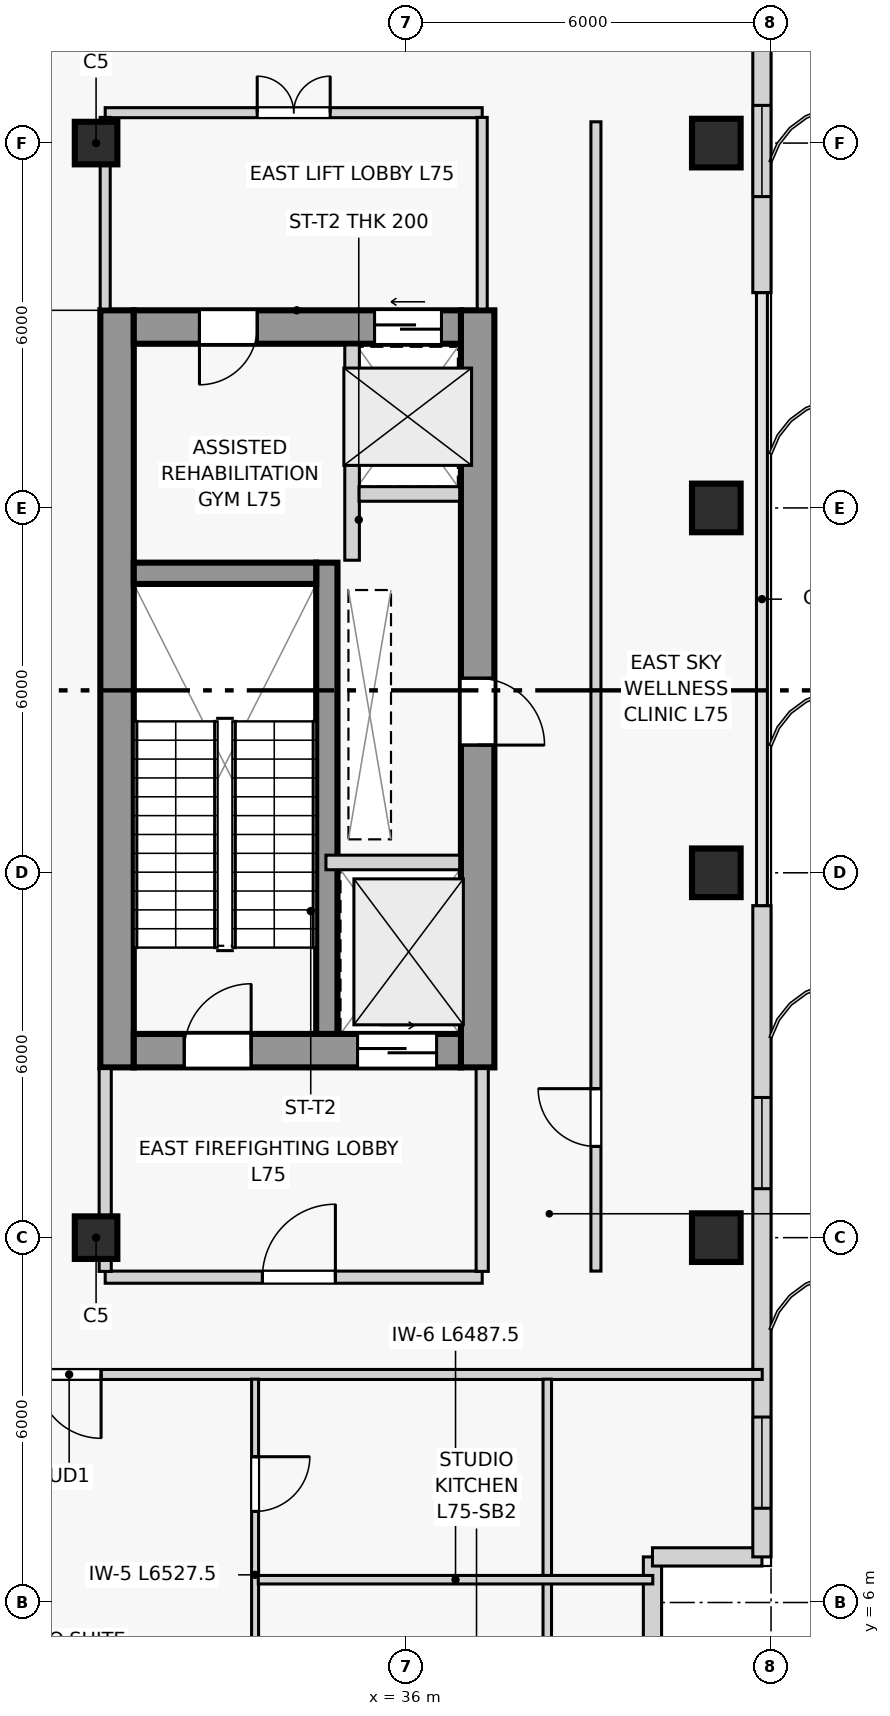
"""IFC4 building model, lengths in metres.
Left out: names, types, materials, properties, quantities, classifications, styles, units other than length and angle.
Written with IfcOpenShell. Run it as: python <this file> out.ifc"""

import sys

from ifc_helpers import new_model, si_unit, direction, frame, frame_2d, origin, origin_2d, place, context, subcontext, project, spatial, rectangle, extrude, source, transform, mapped, element, fill, save


model = new_model("IFC4")
c1 = context("Model", 3, precision=1e-05, world=origin(), true_north=direction((0.0, 1.0)))
c2 = subcontext(c1, "Body", "Model", "MODEL_VIEW")
j1 = project(units=[si_unit("LENGTHUNIT", "METRE"), si_unit("PLANEANGLEUNIT", "RADIAN")], contexts=[c1])
p1 = place(None, origin())
s1 = spatial("IfcSite", under=j1, at=p1, CompositionType="ELEMENT")
p2 = place(p1, origin())
s2 = spatial("IfcBuilding", under=s1, at=p2, CompositionType="ELEMENT")
p3 = place(p2, frame((0.0, 0.0, 285.3)))
s3 = spatial("IfcBuildingStorey", under=s2, at=p3, CompositionType="ELEMENT", Elevation=285.3)
p4 = place(p3, frame((31.245, 14.8, 0.0), z_axis=(0.0, 0.0, 1.0), x_axis=(0.0, 1.0, 0.0)))
e1 = element("IfcWall", 1, at=p4, inside=s3, PredefinedType="SHEAR", context=c2, shape_type="SweptSolid", body=[
    extrude(rectangle(XDim=12.45, YDim=0.55, at=frame_2d((6.225, 0.0))), origin(), (0.0, 0.0, 1.0), 4.2),
])
p5 = place(p3, frame((37.175, 14.8, 0.0), z_axis=(0.0, 0.0, 1.0), x_axis=(0.0, 1.0, 0.0)))
e2 = element("IfcWall", 2, at=p5, inside=s3, PredefinedType="SHEAR", context=c2, shape_type="SweptSolid", body=[
    extrude(rectangle(XDim=12.45, YDim=0.55, at=frame_2d((6.225, 0.0))), origin(), (0.0, 0.0, 1.0), 4.2),
])
p6 = place(p5, frame((5.3, 0.0, 0.0)))
e3 = element("IfcOpeningElement", 3, at=p6, cuts=e2, PredefinedType="OPENING", context=c2, shape_type="SweptSolid", body=[
    extrude(rectangle(XDim=1.1, YDim=2.2, at=frame_2d((0.55, 1.1))), frame((0.0, 0.285, 0.0), z_axis=(0.0, -1.0, 0.0), x_axis=(1.0, 0.0, 0.0)), (0.0, 0.0, 1.0), 0.57),
])
p7 = place(p3, frame((31.52, 15.075, 0.0), z_axis=(0.0, 0.0, 1.0), x_axis=(1.0, 0.0, 0.0)))
e4 = element("IfcWall", 4, at=p7, inside=s3, PredefinedType="SHEAR", context=c2, shape_type="SweptSolid", body=[
    extrude(rectangle(XDim=5.38, YDim=0.55, at=frame_2d((2.69, 0.0))), origin(), (0.0, 0.0, 1.0), 4.2),
])
p8 = place(p7, frame((0.83, 0.0, 0.0)))
e5 = element("IfcOpeningElement", 5, at=p8, cuts=e4, PredefinedType="OPENING", context=c2, shape_type="SweptSolid", body=[
    extrude(rectangle(XDim=1.1, YDim=2.2, at=frame_2d((0.55, 1.1))), frame((0.0, 0.285, 0.0), z_axis=(0.0, -1.0, 0.0), x_axis=(1.0, 0.0, 0.0)), (0.0, 0.0, 1.0), 0.57),
])
p9 = place(p7, frame((3.68, 0.0, 0.0)))
e6 = element("IfcOpeningElement", 6, at=p9, cuts=e4, PredefinedType="OPENING", context=c2, shape_type="SweptSolid", body=[
    extrude(rectangle(XDim=1.3, YDim=2.2, at=frame_2d((0.65, 1.1))), frame((0.0, 0.285, 0.0), z_axis=(0.0, -1.0, 0.0), x_axis=(1.0, 0.0, 0.0)), (0.0, 0.0, 1.0), 0.57),
])
p10 = place(p3, frame((31.52, 26.975, 0.0), z_axis=(0.0, 0.0, 1.0), x_axis=(1.0, 0.0, 0.0)))
e7 = element("IfcWall", 7, at=p10, inside=s3, PredefinedType="SHEAR", context=c2, shape_type="SweptSolid", body=[
    extrude(rectangle(XDim=5.38, YDim=0.55, at=frame_2d((2.69, 0.0))), origin(), (0.0, 0.0, 1.0), 4.2),
])
p11 = place(p10, frame((1.08, 0.0, 0.0)))
e8 = element("IfcOpeningElement", 8, at=p11, cuts=e7, PredefinedType="OPENING", context=c2, shape_type="SweptSolid", body=[
    extrude(rectangle(XDim=0.95, YDim=2.1, at=frame_2d((0.475, 1.05))), frame((0.0, 0.285, 0.0), z_axis=(0.0, -1.0, 0.0), x_axis=(1.0, 0.0, 0.0)), (0.0, 0.0, 1.0), 0.57),
])
p12 = place(p10, frame((3.96, 0.0, 0.0)))
e9 = element("IfcOpeningElement", 9, at=p12, cuts=e7, PredefinedType="OPENING", context=c2, shape_type="SweptSolid", body=[
    extrude(rectangle(XDim=1.1, YDim=2.2, at=frame_2d((0.55, 1.1))), frame((0.0, 0.285, 0.0), z_axis=(0.0, -1.0, 0.0), x_axis=(1.0, 0.0, 0.0)), (0.0, 0.0, 1.0), 0.57),
])
p13 = place(p3, frame((34.695, 15.35, 0.0), z_axis=(0.0, 0.0, 1.0), x_axis=(0.0, 1.0, 0.0)))
e10 = element("IfcWall", 10, at=p13, inside=s3, PredefinedType="SHEAR", context=c2, shape_type="SweptSolid", body=[
    extrude(rectangle(XDim=7.75, YDim=0.35, at=frame_2d((3.875, 0.0))), origin(), (0.0, 0.0, 1.0), 4.2),
])
p14 = place(p3, frame((31.52, 22.925, 0.0), z_axis=(0.0, 0.0, 1.0), x_axis=(1.0, 0.0, 0.0)))
e11 = element("IfcWall", 11, at=p14, inside=s3, PredefinedType="SHEAR", context=c2, shape_type="SweptSolid", body=[
    extrude(rectangle(XDim=3.0, YDim=0.35, at=frame_2d((1.5, 0.0))), origin(), (0.0, 0.0, 1.0), 4.2),
])
m1 = source(origin(), c2, "Body", "SweptSolid", [
    extrude(rectangle(XDim=0.8, YDim=0.8, at=origin_2d()), origin(), (0.0, 0.0, 1.0), 4.2),
])
for number, where, z_axis, x_axis in (
    (12, (41.1, 12.0, 0.0), (0.0, 0.0, 1.0), (1.0, 0.0, 0.0)),
    (13, (41.1, 18.0, 0.0), (0.0, 0.0, 1.0), (1.0, 0.0, 0.0)),
    (14, (41.1, 24.0, 0.0), (0.0, 0.0, 1.0), (1.0, 0.0, 0.0)),
    (15, (41.1, 30.0, 0.0), (0.0, 0.0, 1.0), (1.0, 0.0, 0.0)),
):
    element("IfcColumn", number, at=place(p3, frame(where, z_axis=z_axis, x_axis=x_axis)), inside=s3, PredefinedType="COLUMN", context=c2, shape_type="MappedRepresentation", body=[
        mapped(m1, transform((0.0, 0.0, 0.0), scale=1.0)),
    ])
m2 = source(origin(), c2, "Body", "SweptSolid", [
    extrude(rectangle(XDim=0.7, YDim=0.7, at=origin_2d()), origin(), (0.0, 0.0, 1.0), 4.2),
])
for number, where, z_axis, x_axis in (
    (16, (30.9, 12.0, 0.0), (0.0, 0.0, 1.0), (1.0, 0.0, 0.0)),
    (17, (30.9, 30.0, 0.0), (0.0, 0.0, 1.0), (1.0, 0.0, 0.0)),
):
    element("IfcColumn", number, at=place(p3, frame(where, z_axis=z_axis, x_axis=x_axis)), inside=s3, PredefinedType="COLUMN", context=c2, shape_type="MappedRepresentation", body=[
        mapped(m2, transform((0.0, 0.0, 0.0), scale=1.0)),
    ])
for number, where, z_axis, x_axis in (
    (18, (40.05, 4.95, 0.0), (0.0, 0.0, 1.0), (0.0, 1.0, 0.0)),
    (19, (40.05, 6.75, 0.0), (0.0, 0.0, 1.0), (1.0, 0.0, 0.0)),
):
    element("IfcWall", number, at=place(p3, frame(where, z_axis=z_axis, x_axis=x_axis)), inside=s3, PredefinedType="SOLIDWALL", context=c2, shape_type="SweptSolid", body=[
        extrude(rectangle(XDim=1.8, YDim=0.3, at=frame_2d((0.9, 0.0))), origin(), (0.0, 0.0, 1.0), 3.92),
    ])
p15 = place(p3, frame((41.85, 6.75, 0.0), z_axis=(0.0, 0.0, 1.0), x_axis=(0.0, 1.0, 0.0)))
e20 = element("IfcWall", 20, at=p15, inside=s3, PredefinedType="SOLIDWALL", context=c2, shape_type="SweptSolid", body=[
    extrude(rectangle(XDim=10.71, YDim=0.3, at=frame_2d((5.355, 0.0))), origin(), (0.0, 0.0, 1.0), 3.92),
])
p16 = place(p15, frame((0.8, 0.0, 0.85)))
e21 = element("IfcOpeningElement", 21, at=p16, cuts=e20, PredefinedType="OPENING", context=c2, shape_type="SweptSolid", body=[
    extrude(rectangle(XDim=1.5, YDim=1.8, at=frame_2d((0.75, 0.9))), frame((0.0, 0.16, 0.0), z_axis=(0.0, -1.0, 0.0), x_axis=(1.0, 0.0, 0.0)), (0.0, 0.0, 1.0), 0.32),
])
p17 = place(p15, frame((6.055, 0.0, 0.85)))
e22 = element("IfcOpeningElement", 22, at=p17, cuts=e20, PredefinedType="OPENING", context=c2, shape_type="SweptSolid", body=[
    extrude(rectangle(XDim=1.5, YDim=1.8, at=frame_2d((0.75, 0.9))), frame((0.0, 0.16, 0.0), z_axis=(0.0, -1.0, 0.0), x_axis=(1.0, 0.0, 0.0)), (0.0, 0.0, 1.0), 0.32),
])
p18 = place(p3, frame((41.85, 27.54, 0.0), z_axis=(0.0, 0.0, 1.0), x_axis=(0.0, 1.0, 0.0)))
e23 = element("IfcWall", 23, at=p18, inside=s3, PredefinedType="SOLIDWALL", context=c2, shape_type="SweptSolid", body=[
    extrude(rectangle(XDim=10.71, YDim=0.3, at=frame_2d((5.355, 0.0))), origin(), (0.0, 0.0, 1.0), 3.92),
])
p19 = place(p18, frame((1.58, 0.0, 0.85)))
e24 = element("IfcOpeningElement", 24, at=p19, cuts=e23, PredefinedType="OPENING", context=c2, shape_type="SweptSolid", body=[
    extrude(rectangle(XDim=1.5, YDim=1.8, at=frame_2d((0.75, 0.9))), frame((0.0, 0.16, 0.0), z_axis=(0.0, -1.0, 0.0), x_axis=(1.0, 0.0, 0.0)), (0.0, 0.0, 1.0), 0.32),
])
p20 = place(p18, frame((6.835, 0.0, 0.85)))
e25 = element("IfcOpeningElement", 25, at=p20, cuts=e23, PredefinedType="OPENING", context=c2, shape_type="SweptSolid", body=[
    extrude(rectangle(XDim=1.5, YDim=1.8, at=frame_2d((0.75, 0.9))), frame((0.0, 0.16, 0.0), z_axis=(0.0, -1.0, 0.0), x_axis=(1.0, 0.0, 0.0)), (0.0, 0.0, 1.0), 0.32),
])
p21 = place(p3, frame((34.68, 18.17, 0.0), z_axis=(0.0, 0.0, 1.0), x_axis=(1.0, 0.0, 0.0)))
e26 = element("IfcWall", 26, at=p21, inside=s3, PredefinedType="PARTITIONING", context=c2, shape_type="SweptSolid", body=[
    extrude(rectangle(XDim=2.2, YDim=0.24, at=frame_2d((1.1, 0.0))), origin(), (0.0, 0.0, 1.0), 3.92),
])
p22 = place(p3, frame((31.05, 11.35, 0.0), z_axis=(0.0, 0.0, 1.0), x_axis=(1.0, 0.0, 0.0)))
e27 = element("IfcWall", 27, at=p22, inside=s3, PredefinedType="PARTITIONING", context=c2, shape_type="SweptSolid", body=[
    extrude(rectangle(XDim=6.2, YDim=0.2, at=frame_2d((3.1, 0.0))), origin(), (0.0, 0.0, 1.0), 3.92),
])
p23 = place(p22, frame((2.586, 0.0, 0.0)))
e28 = element("IfcOpeningElement", 28, at=p23, cuts=e27, PredefinedType="OPENING", context=c2, shape_type="SweptSolid", body=[
    extrude(rectangle(XDim=1.2, YDim=2.2, at=frame_2d((0.6, 1.1))), frame((0.0, 0.11, 0.0), z_axis=(0.0, -1.0, 0.0), x_axis=(1.0, 0.0, 0.0)), (0.0, 0.0, 1.0), 0.22),
])
p24 = place(p3, frame((31.05, 11.445, 0.0), z_axis=(0.0, 0.0, 1.0), x_axis=(0.0, 1.0, 0.0)))
e29 = element("IfcWall", 29, at=p24, inside=s3, PredefinedType="PARTITIONING", context=c2, shape_type="SweptSolid", body=[
    extrude(rectangle(XDim=3.335, YDim=0.2, at=frame_2d((1.667, 0.0))), origin(), (0.0, 0.0, 1.0), 3.07),
])
p25 = place(p3, frame((37.25, 11.445, 0.0), z_axis=(0.0, 0.0, 1.0), x_axis=(0.0, 1.0, 0.0)))
e30 = element("IfcWall", 30, at=p25, inside=s3, PredefinedType="PARTITIONING", context=c2, shape_type="SweptSolid", body=[
    extrude(rectangle(XDim=3.335, YDim=0.2, at=frame_2d((1.667, 0.0))), origin(), (0.0, 0.0, 1.0), 3.92),
])
p26 = place(p3, frame((35.11, 23.14, 0.0), z_axis=(0.0, 0.0, 1.0), x_axis=(0.0, 1.0, 0.0)))
e31 = element("IfcWall", 31, at=p26, inside=s3, PredefinedType="PARTITIONING", context=c2, shape_type="SweptSolid", body=[
    extrude(rectangle(XDim=3.54, YDim=0.24, at=frame_2d((1.77, 0.0))), origin(), (0.0, 0.0, 1.0), 3.92),
])
p27 = place(p3, frame((35.225, 24.23, 0.0), z_axis=(0.0, 0.0, 1.0), x_axis=(1.0, 0.0, 0.0)))
e32 = element("IfcWall", 32, at=p27, inside=s3, PredefinedType="PARTITIONING", context=c2, shape_type="SweptSolid", body=[
    extrude(rectangle(XDim=1.655, YDim=0.24, at=frame_2d((0.827, 0.0))), origin(), (0.0, 0.0, 1.0), 3.92),
])
p28 = place(p3, frame((31.05, 30.5, 0.0), z_axis=(0.0, 0.0, 1.0), x_axis=(1.0, 0.0, 0.0)))
e33 = element("IfcWall", 33, at=p28, inside=s3, PredefinedType="PARTITIONING", context=c2, shape_type="SweptSolid", body=[
    extrude(rectangle(XDim=6.2, YDim=0.165, at=frame_2d((3.1, 0.0))), origin(), (0.0, 0.0, 1.0), 3.92),
])
p29 = place(p28, frame((2.5, 0.0, 0.0)))
e34 = element("IfcOpeningElement", 34, at=p29, cuts=e33, PredefinedType="OPENING", context=c2, shape_type="SweptSolid", body=[
    extrude(rectangle(XDim=1.2, YDim=2.2, at=frame_2d((0.6, 1.1))), frame((0.0, 0.093, 0.0), z_axis=(0.0, -1.0, 0.0), x_axis=(1.0, 0.0, 0.0)), (0.0, 0.0, 1.0), 0.185),
])
for number, where, z_axis, x_axis in (
    (35, (31.05, 27.27, 0.0), (0.0, 0.0, 1.0), (0.0, 1.0, 0.0)),
    (36, (37.25, 27.27, 0.0), (0.0, 0.0, 1.0), (0.0, 1.0, 0.0)),
):
    element("IfcWall", number, at=place(p3, frame(where, z_axis=z_axis, x_axis=x_axis)), inside=s3, PredefinedType="PARTITIONING", context=c2, shape_type="SweptSolid", body=[
        extrude(rectangle(XDim=3.153, YDim=0.165, at=frame_2d((1.576, 0.0))), origin(), (0.0, 0.0, 1.0), 3.92),
    ])
p30 = place(p3, frame((3.145, 9.75, 0.0), z_axis=(0.0, 0.0, 1.0), x_axis=(1.0, 0.0, 0.0)))
e37 = element("IfcWall", 37, at=p30, inside=s3, PredefinedType="PARTITIONING", context=c2, shape_type="SweptSolid", body=[
    extrude(rectangle(XDim=38.71, YDim=0.165, at=frame_2d((19.355, 0.0))), origin(), (0.0, 0.0, 1.0), 3.92),
])
p31 = place(p30, frame((7.395, 0.0, 0.0)))
e38 = element("IfcOpeningElement", 38, at=p31, cuts=e37, PredefinedType="OPENING", context=c2, shape_type="SweptSolid", body=[
    extrude(rectangle(XDim=1.2, YDim=2.2, at=frame_2d((0.6, 1.1))), frame((0.0, 0.093, 0.0), z_axis=(0.0, -1.0, 0.0), x_axis=(1.0, 0.0, 0.0)), (0.0, 0.0, 1.0), 0.185),
])
p32 = place(p30, frame((17.755, 0.0, 0.0)))
e39 = element("IfcOpeningElement", 39, at=p32, cuts=e37, PredefinedType="OPENING", context=c2, shape_type="SweptSolid", body=[
    extrude(rectangle(XDim=1.2, YDim=2.2, at=frame_2d((0.6, 1.1))), frame((0.0, 0.093, 0.0), z_axis=(0.0, -1.0, 0.0), x_axis=(1.0, 0.0, 0.0)), (0.0, 0.0, 1.0), 0.185),
])
p33 = place(p30, frame((26.788, 0.0, 0.0)))
e40 = element("IfcOpeningElement", 40, at=p33, cuts=e37, PredefinedType="OPENING", context=c2, shape_type="SweptSolid", body=[
    extrude(rectangle(XDim=1.05, YDim=2.15, at=frame_2d((0.525, 1.075))), frame((0.0, 0.093, 0.0), z_axis=(0.0, -1.0, 0.0), x_axis=(1.0, 0.0, 0.0)), (0.0, 0.0, 1.0), 0.185),
])
p34 = place(p3, frame((39.12, 11.45, 0.0), z_axis=(0.0, 0.0, 1.0), x_axis=(0.0, 1.0, 0.0)))
e41 = element("IfcWall", 41, at=p34, inside=s3, PredefinedType="PARTITIONING", context=c2, shape_type="SweptSolid", body=[
    extrude(rectangle(XDim=18.9, YDim=0.165, at=frame_2d((9.45, 0.0))), origin(), (0.0, 0.0, 1.0), 3.92),
])
p35 = place(p34, frame((2.05, 0.0, 0.0)))
e42 = element("IfcOpeningElement", 42, at=p35, cuts=e41, PredefinedType="OPENING", context=c2, shape_type="SweptSolid", body=[
    extrude(rectangle(XDim=0.95, YDim=2.1, at=frame_2d((0.475, 1.05))), frame((0.0, 0.093, 0.0), z_axis=(0.0, -1.0, 0.0), x_axis=(1.0, 0.0, 0.0)), (0.0, 0.0, 1.0), 0.185),
])
p36 = place(p3, frame((38.32, 4.945, 0.0), z_axis=(0.0, 0.0, 1.0), x_axis=(0.0, 1.0, 0.0)))
e43 = element("IfcWall", 43, at=p36, inside=s3, PredefinedType="PARTITIONING", context=c2, shape_type="SweptSolid", body=[
    extrude(rectangle(XDim=4.728, YDim=0.14, at=frame_2d((2.364, 0.0))), origin(), (0.0, 0.0, 1.0), 3.92),
])
p37 = place(p3, frame((33.515, 3.145, 0.0), z_axis=(0.0, 0.0, 1.0), x_axis=(0.0, 1.0, 0.0)))
e44 = element("IfcWall", 44, at=p37, inside=s3, PredefinedType="PARTITIONING", context=c2, shape_type="SweptSolid", body=[
    extrude(rectangle(XDim=6.528, YDim=0.115, at=frame_2d((3.264, 0.0))), origin(), (0.0, 0.0, 1.0), 3.92),
])
p38 = place(p37, frame((1.367, 0.0, 0.0)))
e45 = element("IfcOpeningElement", 45, at=p38, cuts=e44, PredefinedType="OPENING", context=c2, shape_type="SweptSolid", body=[
    extrude(rectangle(XDim=0.9, YDim=2.1, at=frame_2d((0.45, 1.05))), frame((0.0, 0.067, 0.0), z_axis=(0.0, -1.0, 0.0), x_axis=(1.0, 0.0, 0.0)), (0.0, 0.0, 1.0), 0.135),
])
p39 = place(p37, frame((4.353, 0.0, 0.0)))
e46 = element("IfcOpeningElement", 46, at=p39, cuts=e44, PredefinedType="OPENING", context=c2, shape_type="SweptSolid", body=[
    extrude(rectangle(XDim=0.9, YDim=2.1, at=frame_2d((0.45, 1.05))), frame((0.0, 0.067, 0.0), z_axis=(0.0, -1.0, 0.0), x_axis=(1.0, 0.0, 0.0)), (0.0, 0.0, 1.0), 0.135),
])
p40 = place(p3, frame((33.567, 6.375, 0.0), z_axis=(0.0, 0.0, 1.0), x_axis=(1.0, 0.0, 0.0)))
e47 = element("IfcWall", 47, at=p40, inside=s3, PredefinedType="PLUMBINGWALL", context=c2, shape_type="SweptSolid", body=[
    extrude(rectangle(XDim=6.488, YDim=0.14, at=frame_2d((3.244, 0.0))), origin(), (0.0, 0.0, 1.0), 3.92),
])
m3 = source(origin(), c2, "Body", "SweptSolid", [
    extrude(rectangle(XDim=1.5, YDim=1.8, at=frame_2d((0.75, 0.9))), frame((0.0, 0.03, 0.0), z_axis=(0.0, -1.0, 0.0), x_axis=(1.0, 0.0, 0.0)), (0.0, 0.0, 1.0), 0.06),
])
p41 = place(p16, origin())
e48 = element("IfcWindow", 48, at=p41, inside=s3, PartitioningType="SINGLE_PANEL", PredefinedType="WINDOW", context=c2, shape_type="MappedRepresentation", body=[
    mapped(m3, transform((0.0, 0.0, 0.0), scale=1.0)),
])
fill(e21, e48)
p42 = place(p17, origin())
e49 = element("IfcWindow", 49, at=p42, inside=s3, PartitioningType="SINGLE_PANEL", PredefinedType="WINDOW", context=c2, shape_type="MappedRepresentation", body=[
    mapped(m3, transform((0.0, 0.0, 0.0), scale=1.0)),
])
fill(e22, e49)
p43 = place(p19, origin())
e50 = element("IfcWindow", 50, at=p43, inside=s3, PartitioningType="SINGLE_PANEL", PredefinedType="WINDOW", context=c2, shape_type="MappedRepresentation", body=[
    mapped(m3, transform((0.0, 0.0, 0.0), scale=1.0)),
])
fill(e24, e50)
m4 = source(origin(), c2, "Body", "SweptSolid", [
    extrude(rectangle(XDim=1.1, YDim=2.2, at=frame_2d((0.55, 1.1))), frame((0.0, 0.025, 0.0), z_axis=(0.0, -1.0, 0.0), x_axis=(1.0, 0.0, 0.0)), (0.0, 0.0, 1.0), 0.05),
])
p44 = place(p8, origin())
e51 = element("IfcDoor", 51, at=p44, inside=s3, OperationType="SINGLE_SWING_RIGHT", PredefinedType="DOOR", context=c2, shape_type="MappedRepresentation", body=[
    mapped(m4, transform((0.0, 0.0, 0.0), scale=1.0)),
])
fill(e5, e51)
m5 = source(origin(), c2, "Body", "SweptSolid", [
    extrude(rectangle(XDim=1.3, YDim=2.2, at=frame_2d((0.65, 1.1))), frame((0.0, 0.025, 0.0), z_axis=(0.0, -1.0, 0.0), x_axis=(1.0, 0.0, 0.0)), (0.0, 0.0, 1.0), 0.05),
])
p45 = place(p9, origin())
e52 = element("IfcDoor", 52, at=p45, inside=s3, OperationType="SLIDING_TO_RIGHT", PredefinedType="DOOR", context=c2, shape_type="MappedRepresentation", body=[
    mapped(m5, transform((0.0, 0.0, 0.0), scale=1.0)),
])
fill(e6, e52)
m6 = source(origin(), c2, "Body", "SweptSolid", [
    extrude(rectangle(XDim=1.2, YDim=2.2, at=frame_2d((0.6, 1.1))), frame((0.0, 0.025, 0.0), z_axis=(0.0, -1.0, 0.0), x_axis=(1.0, 0.0, 0.0)), (0.0, 0.0, 1.0), 0.05),
])
p46 = place(p23, origin())
e53 = element("IfcDoor", 53, at=p46, inside=s3, OperationType="SINGLE_SWING_RIGHT", PredefinedType="DOOR", context=c2, shape_type="MappedRepresentation", body=[
    mapped(m6, transform((0.0, 0.0, 0.0), scale=1.0)),
])
fill(e28, e53)
m7 = source(origin(), c2, "Body", "SweptSolid", [
    extrude(rectangle(XDim=0.95, YDim=2.1, at=frame_2d((0.475, 1.05))), frame((0.0, 0.025, 0.0), z_axis=(0.0, -1.0, 0.0), x_axis=(1.0, 0.0, 0.0)), (0.0, 0.0, 1.0), 0.05),
])
p47 = place(p11, frame((0.95, 0.0, 0.0), z_axis=(0.0, 0.0, 1.0), x_axis=(-1.0, 0.0, 0.0)))
e54 = element("IfcDoor", 54, at=p47, inside=s3, OperationType="SINGLE_SWING_RIGHT", PredefinedType="DOOR", context=c2, shape_type="MappedRepresentation", body=[
    mapped(m7, transform((0.0, 0.0, 0.0), scale=1.0)),
])
fill(e8, e54)
m8 = source(origin(), c2, "Body", "SweptSolid", [
    extrude(rectangle(XDim=1.1, YDim=2.2, at=frame_2d((0.55, 1.1))), frame((0.0, 0.025, 0.0), z_axis=(0.0, -1.0, 0.0), x_axis=(1.0, 0.0, 0.0)), (0.0, 0.0, 1.0), 0.05),
])
p48 = place(p12, origin())
e55 = element("IfcDoor", 55, at=p48, inside=s3, OperationType="SLIDING_TO_LEFT", PredefinedType="DOOR", context=c2, shape_type="MappedRepresentation", body=[
    mapped(m8, transform((0.0, 0.0, 0.0), scale=1.0)),
])
fill(e9, e55)
p49 = place(p29, origin())
e56 = element("IfcDoor", 56, at=p49, inside=s3, OperationType="DOUBLE_DOOR_SINGLE_SWING", PredefinedType="DOOR", context=c2, shape_type="MappedRepresentation", body=[
    mapped(m6, transform((0.0, 0.0, 0.0), scale=1.0)),
])
fill(e34, e56)
p50 = place(p6, frame((1.1, 0.0, 0.0), z_axis=(0.0, 0.0, 1.0), x_axis=(-1.0, 0.0, 0.0)))
e57 = element("IfcDoor", 57, at=p50, inside=s3, OperationType="SINGLE_SWING_RIGHT", PredefinedType="DOOR", context=c2, shape_type="MappedRepresentation", body=[
    mapped(m4, transform((0.0, 0.0, 0.0), scale=1.0)),
])
fill(e3, e57)
p51 = place(p35, origin())
e58 = element("IfcDoor", 58, at=p51, inside=s3, OperationType="SINGLE_SWING_RIGHT", PredefinedType="DOOR", context=c2, shape_type="MappedRepresentation", body=[
    mapped(m7, transform((0.0, 0.0, 0.0), scale=1.0)),
])
fill(e42, e58)
m9 = source(origin(), c2, "Body", "SweptSolid", [
    extrude(rectangle(XDim=1.05, YDim=2.15, at=frame_2d((0.525, 1.075))), frame((0.0, 0.025, 0.0), z_axis=(0.0, -1.0, 0.0), x_axis=(1.0, 0.0, 0.0)), (0.0, 0.0, 1.0), 0.05),
])
p52 = place(p33, frame((1.05, 0.0, 0.0), z_axis=(0.0, 0.0, 1.0), x_axis=(-1.0, 0.0, 0.0)))
e59 = element("IfcDoor", 59, at=p52, inside=s3, OperationType="SINGLE_SWING_LEFT", PredefinedType="DOOR", context=c2, shape_type="MappedRepresentation", body=[
    mapped(m9, transform((0.0, 0.0, 0.0), scale=1.0)),
])
fill(e40, e59)
m10 = source(origin(), c2, "Body", "SweptSolid", [
    extrude(rectangle(XDim=0.9, YDim=2.1, at=frame_2d((0.45, 1.05))), frame((0.0, 0.025, 0.0), z_axis=(0.0, -1.0, 0.0), x_axis=(1.0, 0.0, 0.0)), (0.0, 0.0, 1.0), 0.05),
])
p53 = place(p39, frame((0.9, 0.0, 0.0), z_axis=(0.0, 0.0, 1.0), x_axis=(-1.0, 0.0, 0.0)))
e60 = element("IfcDoor", 60, at=p53, inside=s3, OperationType="SINGLE_SWING_LEFT", PredefinedType="DOOR", context=c2, shape_type="MappedRepresentation", body=[
    mapped(m10, transform((0.0, 0.0, 0.0), scale=1.0)),
])
fill(e46, e60)
save(model, sys.argv[1])
